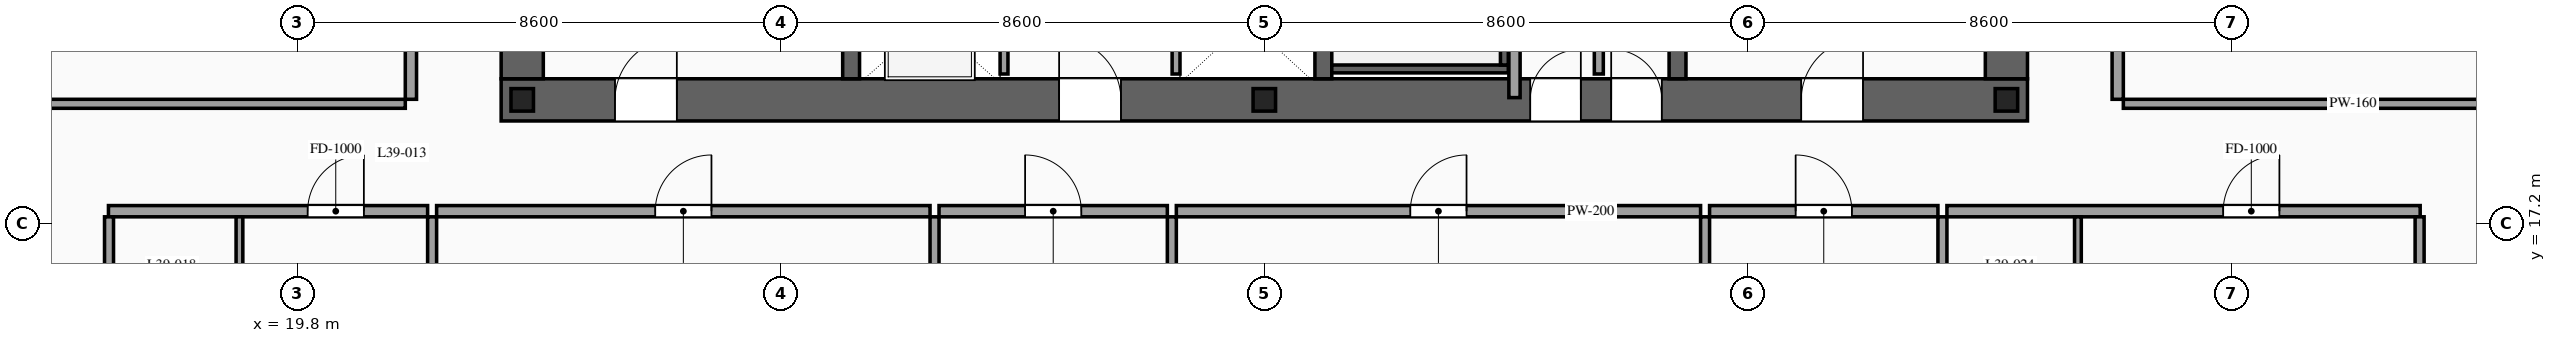
"""IFC4 building model, lengths in metres.
Left out: names, types, materials, properties, quantities, classifications, styles, units other than length and angle.
Written with IfcOpenShell. Run it as: python <this file> out.ifc"""

import sys

from ifc_helpers import new_model, si_unit, direction, frame, frame_2d, origin, origin_2d, place, context, subcontext, project, spatial, rectangle, i_section, extrude, source, transform, mapped, element, fill, save


model = new_model("IFC4")
c1 = context("Model", 3, precision=1e-05, world=origin(), true_north=direction((0.0, 1.0)))
c2 = subcontext(c1, "Body", "Model", "MODEL_VIEW")
j1 = project(units=[si_unit("LENGTHUNIT", "METRE"), si_unit("PLANEANGLEUNIT", "RADIAN")], contexts=[c1])
p1 = place(None, origin())
s1 = spatial("IfcSite", under=j1, at=p1, CompositionType="ELEMENT")
p2 = place(p1, origin())
s2 = spatial("IfcBuilding", under=s1, at=p2, CompositionType="ELEMENT")
p3 = place(p2, frame((0.0, 0.0, 148.8)))
s3 = spatial("IfcBuildingStorey", under=s2, at=p3, CompositionType="ELEMENT", Elevation=148.8)
p4 = place(p3, frame((23.425, 19.4, 0.0), z_axis=(0.0, 0.0, 1.0), x_axis=(1.0, 0.0, 0.0)))
e1 = element("IfcWall", 1, at=p4, inside=s3, PredefinedType="SHEAR", context=c2, shape_type="SweptSolid", body=[
    extrude(rectangle(XDim=27.15, YDim=0.75, at=frame_2d((13.575, 0.0))), origin(), (0.0, 0.0, 1.0), 3.6),
])
p5 = place(p4, frame((2.025, 0.0, 0.0)))
e2 = element("IfcOpeningElement", 2, at=p5, cuts=e1, PredefinedType="OPENING", context=c2, shape_type="SweptSolid", body=[
    extrude(rectangle(XDim=1.1, YDim=2.2, at=frame_2d((0.55, 1.1))), frame((0.0, 0.39, 0.0), z_axis=(0.0, -1.0, 0.0), x_axis=(1.0, 0.0, 0.0)), (0.0, 0.0, 1.0), 0.78),
])
p6 = place(p4, frame((9.925, 0.0, 0.0)))
e3 = element("IfcOpeningElement", 3, at=p6, cuts=e1, PredefinedType="OPENING", context=c2, shape_type="SweptSolid", body=[
    extrude(rectangle(XDim=1.1, YDim=2.2, at=frame_2d((0.55, 1.1))), frame((0.0, 0.39, 0.0), z_axis=(0.0, -1.0, 0.0), x_axis=(1.0, 0.0, 0.0)), (0.0, 0.0, 1.0), 0.78),
])
p7 = place(p4, frame((23.125, 0.0, 0.0)))
e4 = element("IfcOpeningElement", 4, at=p7, cuts=e1, PredefinedType="OPENING", context=c2, shape_type="SweptSolid", body=[
    extrude(rectangle(XDim=1.1, YDim=2.2, at=frame_2d((0.55, 1.1))), frame((0.0, 0.39, 0.0), z_axis=(0.0, -1.0, 0.0), x_axis=(1.0, 0.0, 0.0)), (0.0, 0.0, 1.0), 0.78),
])
p8 = place(p4, frame((19.745, 0.0, 0.0)))
e5 = element("IfcOpeningElement", 5, at=p8, cuts=e1, PredefinedType="OPENING", context=c2, shape_type="SweptSolid", body=[
    extrude(rectangle(XDim=0.9, YDim=2.15, at=frame_2d((0.45, 1.075))), frame((0.0, 0.39, 0.0), z_axis=(0.0, -1.0, 0.0), x_axis=(1.0, 0.0, 0.0)), (0.0, 0.0, 1.0), 0.78),
])
p9 = place(p4, frame((18.305, 0.0, 0.0)))
e6 = element("IfcOpeningElement", 6, at=p9, cuts=e1, PredefinedType="OPENING", context=c2, shape_type="SweptSolid", body=[
    extrude(rectangle(XDim=0.9, YDim=2.15, at=frame_2d((0.45, 1.075))), frame((0.0, 0.39, 0.0), z_axis=(0.0, -1.0, 0.0), x_axis=(1.0, 0.0, 0.0)), (0.0, 0.0, 1.0), 0.78),
])
m1 = source(origin(), c2, "Body", "SweptSolid", [
    extrude(rectangle(XDim=12.05, YDim=0.75, at=frame_2d((6.025, 0.0))), origin(), (0.0, 0.0, 1.0), 3.6),
])
for number, where, z_axis, x_axis in (
    (7, (23.8, 19.775, 0.0), (0.0, 0.0, 1.0), (0.0, 1.0, 0.0)),
    (8, (50.2, 19.775, 0.0), (0.0, 0.0, 1.0), (0.0, 1.0, 0.0)),
):
    element("IfcWall", number, at=place(p3, frame(where, z_axis=z_axis, x_axis=x_axis)), inside=s3, PredefinedType="SHEAR", context=c2, shape_type="MappedRepresentation", body=[
        mapped(m1, transform((0.0, 0.0, 0.0), scale=1.0)),
    ])
m2 = source(origin(), c2, "Body", "SweptSolid", [
    extrude(rectangle(XDim=12.05, YDim=0.3, at=frame_2d((6.025, 0.0))), origin(), (0.0, 0.0, 1.0), 3.6),
])
for number, where, z_axis, x_axis in (
    (9, (29.65, 19.775, 0.0), (0.0, 0.0, 1.0), (0.0, 1.0, 0.0)),
    (10, (38.05, 19.775, 0.0), (0.0, 0.0, 1.0), (0.0, 1.0, 0.0)),
    (11, (44.35, 19.775, 0.0), (0.0, 0.0, 1.0), (0.0, 1.0, 0.0)),
):
    element("IfcWall", number, at=place(p3, frame(where, z_axis=z_axis, x_axis=x_axis)), inside=s3, PredefinedType="SOLIDWALL", context=c2, shape_type="MappedRepresentation", body=[
        mapped(m2, transform((0.0, 0.0, 0.0), scale=1.0)),
    ])
m3 = source(origin(), c2, "Body", "SweptSolid", [
    extrude(i_section(OverallWidth=0.4, OverallDepth=0.4, WebThickness=0.013, FlangeThickness=0.021, at=origin_2d()), origin(), (0.0, 0.0, 1.0), 3.6),
])
for number, where, z_axis, x_axis in (
    (12, (23.8, 19.4, 0.0), (0.0, 0.0, 1.0), (1.0, 0.0, 0.0)),
    (13, (37.0, 19.4, 0.0), (0.0, 0.0, 1.0), (1.0, 0.0, 0.0)),
    (14, (50.2, 19.4, 0.0), (0.0, 0.0, 1.0), (1.0, 0.0, 0.0)),
):
    element("IfcColumn", number, at=place(p3, frame(where, z_axis=z_axis, x_axis=x_axis)), inside=s3, PredefinedType="COLUMN", context=c2, shape_type="MappedRepresentation", body=[
        mapped(m3, transform((0.0, 0.0, 0.0), scale=1.0)),
    ])
p10 = place(p3, frame((32.37, 19.86, 0.0), z_axis=(0.0, 0.0, 1.0), x_axis=(0.0, 1.0, 0.0)))
e15 = element("IfcWall", 15, at=p10, inside=s3, PredefinedType="SOLIDWALL", context=c2, shape_type="SweptSolid", body=[
    extrude(rectangle(XDim=2.04, YDim=0.14, at=frame_2d((1.02, 0.0))), origin(), (0.0, 0.0, 1.0), 3.38),
])
p11 = place(p10, frame((0.47, 0.0, 0.0)))
e16 = element("IfcOpeningElement", 16, at=p11, cuts=e15, PredefinedType="OPENING", context=c2, shape_type="SweptSolid", body=[
    extrude(rectangle(XDim=1.1, YDim=2.2, at=frame_2d((0.55, 1.1))), frame((0.0, 0.085, 0.0), z_axis=(0.0, -1.0, 0.0), x_axis=(1.0, 0.0, 0.0)), (0.0, 0.0, 1.0), 0.17),
])
m4 = source(origin(), c2, "Body", "SweptSolid", [
    extrude(rectangle(XDim=2.04, YDim=0.14, at=frame_2d((1.02, 0.0))), origin(), (0.0, 0.0, 1.0), 3.38),
])
p12 = place(p3, frame((35.43, 19.86, 0.0), z_axis=(0.0, 0.0, 1.0), x_axis=(0.0, 1.0, 0.0)))
e17 = element("IfcWall", 17, at=p12, inside=s3, PredefinedType="SOLIDWALL", context=c2, shape_type="MappedRepresentation", body=[
    mapped(m4, transform((0.0, 0.0, 0.0), scale=1.0)),
])
m5 = source(origin(), c2, "Body", "SweptSolid", [
    extrude(rectangle(XDim=3.14, YDim=0.14, at=frame_2d((1.57, 0.0))), origin(), (0.0, 0.0, 1.0), 3.38),
])
p13 = place(p3, frame((38.2, 19.95, 0.0), z_axis=(0.0, 0.0, 1.0), x_axis=(1.0, 0.0, 0.0)))
e18 = element("IfcWall", 18, at=p13, inside=s3, PredefinedType="SOLIDWALL", context=c2, shape_type="MappedRepresentation", body=[
    mapped(m5, transform((0.0, 0.0, 0.0), scale=1.0)),
])
m6 = source(origin(), c2, "Body", "SweptSolid", [
    extrude(rectangle(XDim=8.94, YDim=0.14, at=frame_2d((4.47, 0.0))), origin(), (0.0, 0.0, 1.0), 3.38),
])
p14 = place(p3, frame((41.27, 20.02, 0.0), z_axis=(0.0, 0.0, 1.0), x_axis=(0.0, 1.0, 0.0)))
e19 = element("IfcWall", 19, at=p14, inside=s3, PredefinedType="SOLIDWALL", context=c2, shape_type="MappedRepresentation", body=[
    mapped(m6, transform((0.0, 0.0, 0.0), scale=1.0)),
])
m7 = source(origin(), c2, "Body", "SweptSolid", [
    extrude(rectangle(XDim=1.34, YDim=0.16, at=frame_2d((0.67, 0.0))), origin(), (0.0, 0.0, 1.0), 3.38),
])
p15 = place(p3, frame((42.95, 19.86, 0.0), z_axis=(0.0, 0.0, 1.0), x_axis=(0.0, 1.0, 0.0)))
e20 = element("IfcWall", 20, at=p15, inside=s3, PredefinedType="PARTITIONING", context=c2, shape_type="MappedRepresentation", body=[
    mapped(m7, transform((0.0, 0.0, 0.0), scale=1.0)),
])
m8 = source(origin(), c2, "Body", "SweptSolid", [
    extrude(rectangle(XDim=12.72, YDim=0.2, at=frame_2d((6.36, 0.0))), origin(), (0.0, 0.0, 1.0), 3.38),
])
p16 = place(p3, frame((41.45, 19.44, 0.0), z_axis=(0.0, 0.0, 1.0), x_axis=(0.0, 1.0, 0.0)))
e21 = element("IfcWall", 21, at=p16, inside=s3, PredefinedType="PARTITIONING", context=c2, shape_type="MappedRepresentation", body=[
    mapped(m8, transform((0.0, 0.0, 0.0), scale=1.0)),
])
p17 = place(p3, frame((16.44, 17.42, 0.0), z_axis=(0.0, 0.0, 1.0), x_axis=(1.0, 0.0, 0.0)))
e22 = element("IfcWall", 22, at=p17, inside=s3, PredefinedType="PARTITIONING", context=c2, shape_type="SweptSolid", body=[
    extrude(rectangle(XDim=5.677, YDim=0.2, at=frame_2d((2.838, 0.0))), origin(), (0.0, 0.0, 1.0), 3.38),
])
p18 = place(p17, frame((3.543, 0.0, 0.0)))
e23 = element("IfcOpeningElement", 23, at=p18, cuts=e22, PredefinedType="OPENING", context=c2, shape_type="SweptSolid", body=[
    extrude(rectangle(XDim=1.0, YDim=2.2, at=frame_2d((0.5, 1.1))), frame((0.0, 0.115, 0.0), z_axis=(0.0, -1.0, 0.0), x_axis=(1.0, 0.0, 0.0)), (0.0, 0.0, 1.0), 0.23),
])
m9 = source(origin(), c2, "Body", "SweptSolid", [
    extrude(rectangle(XDim=14.97, YDim=0.16, at=frame_2d((7.485, 0.0))), origin(), (0.0, 0.0, 1.0), 3.38),
])
p19 = place(p3, frame((22.197, 2.35, 0.0), z_axis=(0.0, 0.0, 1.0), x_axis=(0.0, 1.0, 0.0)))
e24 = element("IfcWall", 24, at=p19, inside=s3, PredefinedType="PARTITIONING", context=c2, shape_type="MappedRepresentation", body=[
    mapped(m9, transform((0.0, 0.0, 0.0), scale=1.0)),
])
m10 = source(origin(), c2, "Body", "SweptSolid", [
    extrude(rectangle(XDim=2.42, YDim=0.12, at=frame_2d((1.21, 0.0))), origin(), (0.0, 0.0, 1.0), 3.38),
])
p20 = place(p3, frame((18.77, 14.9, 0.0), z_axis=(0.0, 0.0, 1.0), x_axis=(0.0, 1.0, 0.0)))
e25 = element("IfcWall", 25, at=p20, inside=s3, PredefinedType="PARTITIONING", context=c2, shape_type="MappedRepresentation", body=[
    mapped(m10, transform((0.0, 0.0, 0.0), scale=1.0)),
])
p21 = place(p3, frame((22.277, 17.42, 0.0), z_axis=(0.0, 0.0, 1.0), x_axis=(1.0, 0.0, 0.0)))
e26 = element("IfcWall", 26, at=p21, inside=s3, PredefinedType="PARTITIONING", context=c2, shape_type="SweptSolid", body=[
    extrude(rectangle(XDim=8.777, YDim=0.2, at=frame_2d((4.388, 0.0))), origin(), (0.0, 0.0, 1.0), 3.38),
])
p22 = place(p21, frame((3.889, 0.0, 0.0)))
e27 = element("IfcOpeningElement", 27, at=p22, cuts=e26, PredefinedType="OPENING", context=c2, shape_type="SweptSolid", body=[
    extrude(rectangle(XDim=1.0, YDim=2.2, at=frame_2d((0.5, 1.1))), frame((0.0, 0.115, 0.0), z_axis=(0.0, -1.0, 0.0), x_axis=(1.0, 0.0, 0.0)), (0.0, 0.0, 1.0), 0.23),
])
p23 = place(p3, frame((31.134, 2.35, 0.0), z_axis=(0.0, 0.0, 1.0), x_axis=(0.0, 1.0, 0.0)))
e28 = element("IfcWall", 28, at=p23, inside=s3, PredefinedType="PARTITIONING", context=c2, shape_type="MappedRepresentation", body=[
    mapped(m9, transform((0.0, 0.0, 0.0), scale=1.0)),
])
p24 = place(p3, frame((31.214, 17.42, 0.0), z_axis=(0.0, 0.0, 1.0), x_axis=(1.0, 0.0, 0.0)))
e29 = element("IfcWall", 29, at=p24, inside=s3, PredefinedType="PARTITIONING", context=c2, shape_type="SweptSolid", body=[
    extrude(rectangle(XDim=4.061, YDim=0.2, at=frame_2d((2.03, 0.0))), origin(), (0.0, 0.0, 1.0), 3.38),
])
p25 = place(p24, frame((1.531, 0.0, 0.0)))
e30 = element("IfcOpeningElement", 30, at=p25, cuts=e29, PredefinedType="OPENING", context=c2, shape_type="SweptSolid", body=[
    extrude(rectangle(XDim=1.0, YDim=2.2, at=frame_2d((0.5, 1.1))), frame((0.0, 0.115, 0.0), z_axis=(0.0, -1.0, 0.0), x_axis=(1.0, 0.0, 0.0)), (0.0, 0.0, 1.0), 0.23),
])
p26 = place(p3, frame((35.355, 2.35, 0.0), z_axis=(0.0, 0.0, 1.0), x_axis=(0.0, 1.0, 0.0)))
e31 = element("IfcWall", 31, at=p26, inside=s3, PredefinedType="PARTITIONING", context=c2, shape_type="MappedRepresentation", body=[
    mapped(m9, transform((0.0, 0.0, 0.0), scale=1.0)),
])
p27 = place(p3, frame((35.435, 17.42, 0.0), z_axis=(0.0, 0.0, 1.0), x_axis=(1.0, 0.0, 0.0)))
e32 = element("IfcWall", 32, at=p27, inside=s3, PredefinedType="PARTITIONING", context=c2, shape_type="SweptSolid", body=[
    extrude(rectangle(XDim=9.325, YDim=0.2, at=frame_2d((4.663, 0.0))), origin(), (0.0, 0.0, 1.0), 3.38),
])
p28 = place(p27, frame((4.162, 0.0, 0.0)))
e33 = element("IfcOpeningElement", 33, at=p28, cuts=e32, PredefinedType="OPENING", context=c2, shape_type="SweptSolid", body=[
    extrude(rectangle(XDim=1.0, YDim=2.2, at=frame_2d((0.5, 1.1))), frame((0.0, 0.115, 0.0), z_axis=(0.0, -1.0, 0.0), x_axis=(1.0, 0.0, 0.0)), (0.0, 0.0, 1.0), 0.23),
])
p29 = place(p3, frame((44.84, 2.35, 0.0), z_axis=(0.0, 0.0, 1.0), x_axis=(0.0, 1.0, 0.0)))
e34 = element("IfcWall", 34, at=p29, inside=s3, PredefinedType="PARTITIONING", context=c2, shape_type="MappedRepresentation", body=[
    mapped(m9, transform((0.0, 0.0, 0.0), scale=1.0)),
])
p30 = place(p3, frame((44.92, 17.42, 0.0), z_axis=(0.0, 0.0, 1.0), x_axis=(1.0, 0.0, 0.0)))
e35 = element("IfcWall", 35, at=p30, inside=s3, PredefinedType="PARTITIONING", context=c2, shape_type="SweptSolid", body=[
    extrude(rectangle(XDim=4.062, YDim=0.2, at=frame_2d((2.031, 0.0))), origin(), (0.0, 0.0, 1.0), 3.38),
])
p31 = place(p30, frame((1.531, 0.0, 0.0)))
e36 = element("IfcOpeningElement", 36, at=p31, cuts=e35, PredefinedType="OPENING", context=c2, shape_type="SweptSolid", body=[
    extrude(rectangle(XDim=1.0, YDim=2.2, at=frame_2d((0.5, 1.1))), frame((0.0, 0.115, 0.0), z_axis=(0.0, -1.0, 0.0), x_axis=(1.0, 0.0, 0.0)), (0.0, 0.0, 1.0), 0.23),
])
p32 = place(p3, frame((49.062, 2.35, 0.0), z_axis=(0.0, 0.0, 1.0), x_axis=(0.0, 1.0, 0.0)))
e37 = element("IfcWall", 37, at=p32, inside=s3, PredefinedType="PARTITIONING", context=c2, shape_type="MappedRepresentation", body=[
    mapped(m9, transform((0.0, 0.0, 0.0), scale=1.0)),
])
p33 = place(p3, frame((49.142, 17.42, 0.0), z_axis=(0.0, 0.0, 1.0), x_axis=(1.0, 0.0, 0.0)))
e38 = element("IfcWall", 38, at=p33, inside=s3, PredefinedType="PARTITIONING", context=c2, shape_type="SweptSolid", body=[
    extrude(rectangle(XDim=8.418, YDim=0.2, at=frame_2d((4.209, 0.0))), origin(), (0.0, 0.0, 1.0), 3.38),
])
p34 = place(p33, frame((4.914, 0.0, 0.0)))
e39 = element("IfcOpeningElement", 39, at=p34, cuts=e38, PredefinedType="OPENING", context=c2, shape_type="SweptSolid", body=[
    extrude(rectangle(XDim=1.0, YDim=2.2, at=frame_2d((0.5, 1.1))), frame((0.0, 0.115, 0.0), z_axis=(0.0, -1.0, 0.0), x_axis=(1.0, 0.0, 0.0)), (0.0, 0.0, 1.0), 0.23),
])
m11 = source(origin(), c2, "Body", "SweptSolid", [
    extrude(rectangle(XDim=14.82, YDim=0.16, at=frame_2d((7.41, 0.0))), origin(), (0.0, 0.0, 1.0), 3.38),
])
for number, where, z_axis, x_axis in (
    (40, (16.45, 2.5, 0.0), (0.0, 0.0, 1.0), (0.0, 1.0, 0.0)),
    (41, (57.55, 2.5, 0.0), (0.0, 0.0, 1.0), (0.0, 1.0, 0.0)),
):
    element("IfcWall", number, at=place(p3, frame(where, z_axis=z_axis, x_axis=x_axis)), inside=s3, PredefinedType="PARTITIONING", context=c2, shape_type="MappedRepresentation", body=[
        mapped(m11, transform((0.0, 0.0, 0.0), scale=1.0)),
    ])
p35 = place(p3, frame((51.472, 14.9, 0.0), z_axis=(0.0, 0.0, 1.0), x_axis=(0.0, 1.0, 0.0)))
e42 = element("IfcWall", 42, at=p35, inside=s3, PredefinedType="PARTITIONING", context=c2, shape_type="MappedRepresentation", body=[
    mapped(m10, transform((0.0, 0.0, 0.0), scale=1.0)),
])
p36 = place(p3, frame((21.82, 19.41, 0.0), z_axis=(0.0, 0.0, 1.0), x_axis=(0.0, 1.0, 0.0)))
e43 = element("IfcWall", 43, at=p36, inside=s3, PredefinedType="PARTITIONING", context=c2, shape_type="SweptSolid", body=[
    extrude(rectangle(XDim=6.31, YDim=0.2, at=frame_2d((3.155, 0.0))), origin(), (0.0, 0.0, 1.0), 3.38),
])
p37 = place(p36, frame((2.655, 0.0, 0.0)))
e44 = element("IfcOpeningElement", 44, at=p37, cuts=e43, PredefinedType="OPENING", context=c2, shape_type="SweptSolid", body=[
    extrude(rectangle(XDim=1.0, YDim=2.2, at=frame_2d((0.5, 1.1))), frame((0.0, 0.115, 0.0), z_axis=(0.0, -1.0, 0.0), x_axis=(1.0, 0.0, 0.0)), (0.0, 0.0, 1.0), 0.23),
])
m12 = source(origin(), c2, "Body", "SweptSolid", [
    extrude(rectangle(XDim=8.17, YDim=0.16, at=frame_2d((4.085, 0.0))), origin(), (0.0, 0.0, 1.0), 2.875),
])
p38 = place(p3, frame((13.55, 19.33, 0.0), z_axis=(0.0, 0.0, 1.0), x_axis=(1.0, 0.0, 0.0)))
e45 = element("IfcWall", 45, at=p38, inside=s3, PredefinedType="PARTITIONING", context=c2, shape_type="MappedRepresentation", body=[
    mapped(m12, transform((0.0, 0.0, 0.0), scale=1.0)),
])
p39 = place(p3, frame((52.18, 19.41, 0.0), z_axis=(0.0, 0.0, 1.0), x_axis=(0.0, 1.0, 0.0)))
e46 = element("IfcWall", 46, at=p39, inside=s3, PredefinedType="PARTITIONING", context=c2, shape_type="SweptSolid", body=[
    extrude(rectangle(XDim=6.31, YDim=0.2, at=frame_2d((3.155, 0.0))), origin(), (0.0, 0.0, 1.0), 3.38),
])
p40 = place(p39, frame((2.655, 0.0, 0.0)))
e47 = element("IfcOpeningElement", 47, at=p40, cuts=e46, PredefinedType="OPENING", context=c2, shape_type="SweptSolid", body=[
    extrude(rectangle(XDim=1.0, YDim=2.2, at=frame_2d((0.5, 1.1))), frame((0.0, 0.115, 0.0), z_axis=(0.0, -1.0, 0.0), x_axis=(1.0, 0.0, 0.0)), (0.0, 0.0, 1.0), 0.23),
])
p41 = place(p3, frame((52.28, 19.33, 0.0), z_axis=(0.0, 0.0, 1.0), x_axis=(1.0, 0.0, 0.0)))
e48 = element("IfcWall", 48, at=p41, inside=s3, PredefinedType="PARTITIONING", context=c2, shape_type="MappedRepresentation", body=[
    mapped(m12, transform((0.0, 0.0, 0.0), scale=1.0)),
])
m13 = source(origin(), c2, "Body", "SweptSolid", [
    extrude(rectangle(XDim=1.1, YDim=2.2, at=frame_2d((0.55, 1.1))), frame((0.0, 0.025, 0.0), z_axis=(0.0, -1.0, 0.0), x_axis=(1.0, 0.0, 0.0)), (0.0, 0.0, 1.0), 0.05),
])
p42 = place(p5, origin())
e49 = element("IfcDoor", 49, at=p42, inside=s3, OperationType="SINGLE_SWING_RIGHT", PredefinedType="DOOR", context=c2, shape_type="MappedRepresentation", body=[
    mapped(m13, transform((0.0, 0.0, 0.0), scale=1.0)),
])
fill(e2, e49)
p43 = place(p6, origin())
e50 = element("IfcDoor", 50, at=p43, inside=s3, OperationType="SINGLE_SWING_LEFT", PredefinedType="DOOR", context=c2, shape_type="MappedRepresentation", body=[
    mapped(m13, transform((0.0, 0.0, 0.0), scale=1.0)),
])
fill(e3, e50)
p44 = place(p7, origin())
e51 = element("IfcDoor", 51, at=p44, inside=s3, OperationType="SINGLE_SWING_RIGHT", PredefinedType="DOOR", context=c2, shape_type="MappedRepresentation", body=[
    mapped(m13, transform((0.0, 0.0, 0.0), scale=1.0)),
])
fill(e4, e51)
m14 = source(origin(), c2, "Body", "SweptSolid", [
    extrude(rectangle(XDim=0.9, YDim=2.15, at=frame_2d((0.45, 1.075))), frame((0.0, 0.025, 0.0), z_axis=(0.0, -1.0, 0.0), x_axis=(1.0, 0.0, 0.0)), (0.0, 0.0, 1.0), 0.05),
])
p45 = place(p8, origin())
e52 = element("IfcDoor", 52, at=p45, inside=s3, OperationType="SINGLE_SWING_LEFT", PredefinedType="DOOR", context=c2, shape_type="MappedRepresentation", body=[
    mapped(m14, transform((0.0, 0.0, 0.0), scale=1.0)),
])
fill(e5, e52)
p46 = place(p9, origin())
e53 = element("IfcDoor", 53, at=p46, inside=s3, OperationType="SINGLE_SWING_RIGHT", PredefinedType="DOOR", context=c2, shape_type="MappedRepresentation", body=[
    mapped(m14, transform((0.0, 0.0, 0.0), scale=1.0)),
])
fill(e6, e53)
m15 = source(origin(), c2, "Body", "SweptSolid", [
    extrude(rectangle(XDim=1.0, YDim=2.2, at=frame_2d((0.5, 1.1))), frame((0.0, 0.025, 0.0), z_axis=(0.0, -1.0, 0.0), x_axis=(1.0, 0.0, 0.0)), (0.0, 0.0, 1.0), 0.05),
])
p47 = place(p18, origin())
e54 = element("IfcDoor", 54, at=p47, inside=s3, OperationType="SINGLE_SWING_RIGHT", PredefinedType="DOOR", context=c2, shape_type="MappedRepresentation", body=[
    mapped(m15, transform((0.0, 0.0, 0.0), scale=1.0)),
])
fill(e23, e54)
p48 = place(p22, origin())
e55 = element("IfcDoor", 55, at=p48, inside=s3, OperationType="SINGLE_SWING_RIGHT", PredefinedType="DOOR", context=c2, shape_type="MappedRepresentation", body=[
    mapped(m15, transform((0.0, 0.0, 0.0), scale=1.0)),
])
fill(e27, e55)
p49 = place(p25, origin())
e56 = element("IfcDoor", 56, at=p49, inside=s3, OperationType="SINGLE_SWING_LEFT", PredefinedType="DOOR", context=c2, shape_type="MappedRepresentation", body=[
    mapped(m15, transform((0.0, 0.0, 0.0), scale=1.0)),
])
fill(e30, e56)
p50 = place(p28, origin())
e57 = element("IfcDoor", 57, at=p50, inside=s3, OperationType="SINGLE_SWING_RIGHT", PredefinedType="DOOR", context=c2, shape_type="MappedRepresentation", body=[
    mapped(m15, transform((0.0, 0.0, 0.0), scale=1.0)),
])
fill(e33, e57)
p51 = place(p31, origin())
e58 = element("IfcDoor", 58, at=p51, inside=s3, OperationType="SINGLE_SWING_LEFT", PredefinedType="DOOR", context=c2, shape_type="MappedRepresentation", body=[
    mapped(m15, transform((0.0, 0.0, 0.0), scale=1.0)),
])
fill(e36, e58)
p52 = place(p34, origin())
e59 = element("IfcDoor", 59, at=p52, inside=s3, OperationType="SINGLE_SWING_RIGHT", PredefinedType="DOOR", context=c2, shape_type="MappedRepresentation", body=[
    mapped(m15, transform((0.0, 0.0, 0.0), scale=1.0)),
])
fill(e39, e59)
save(model, sys.argv[1])
